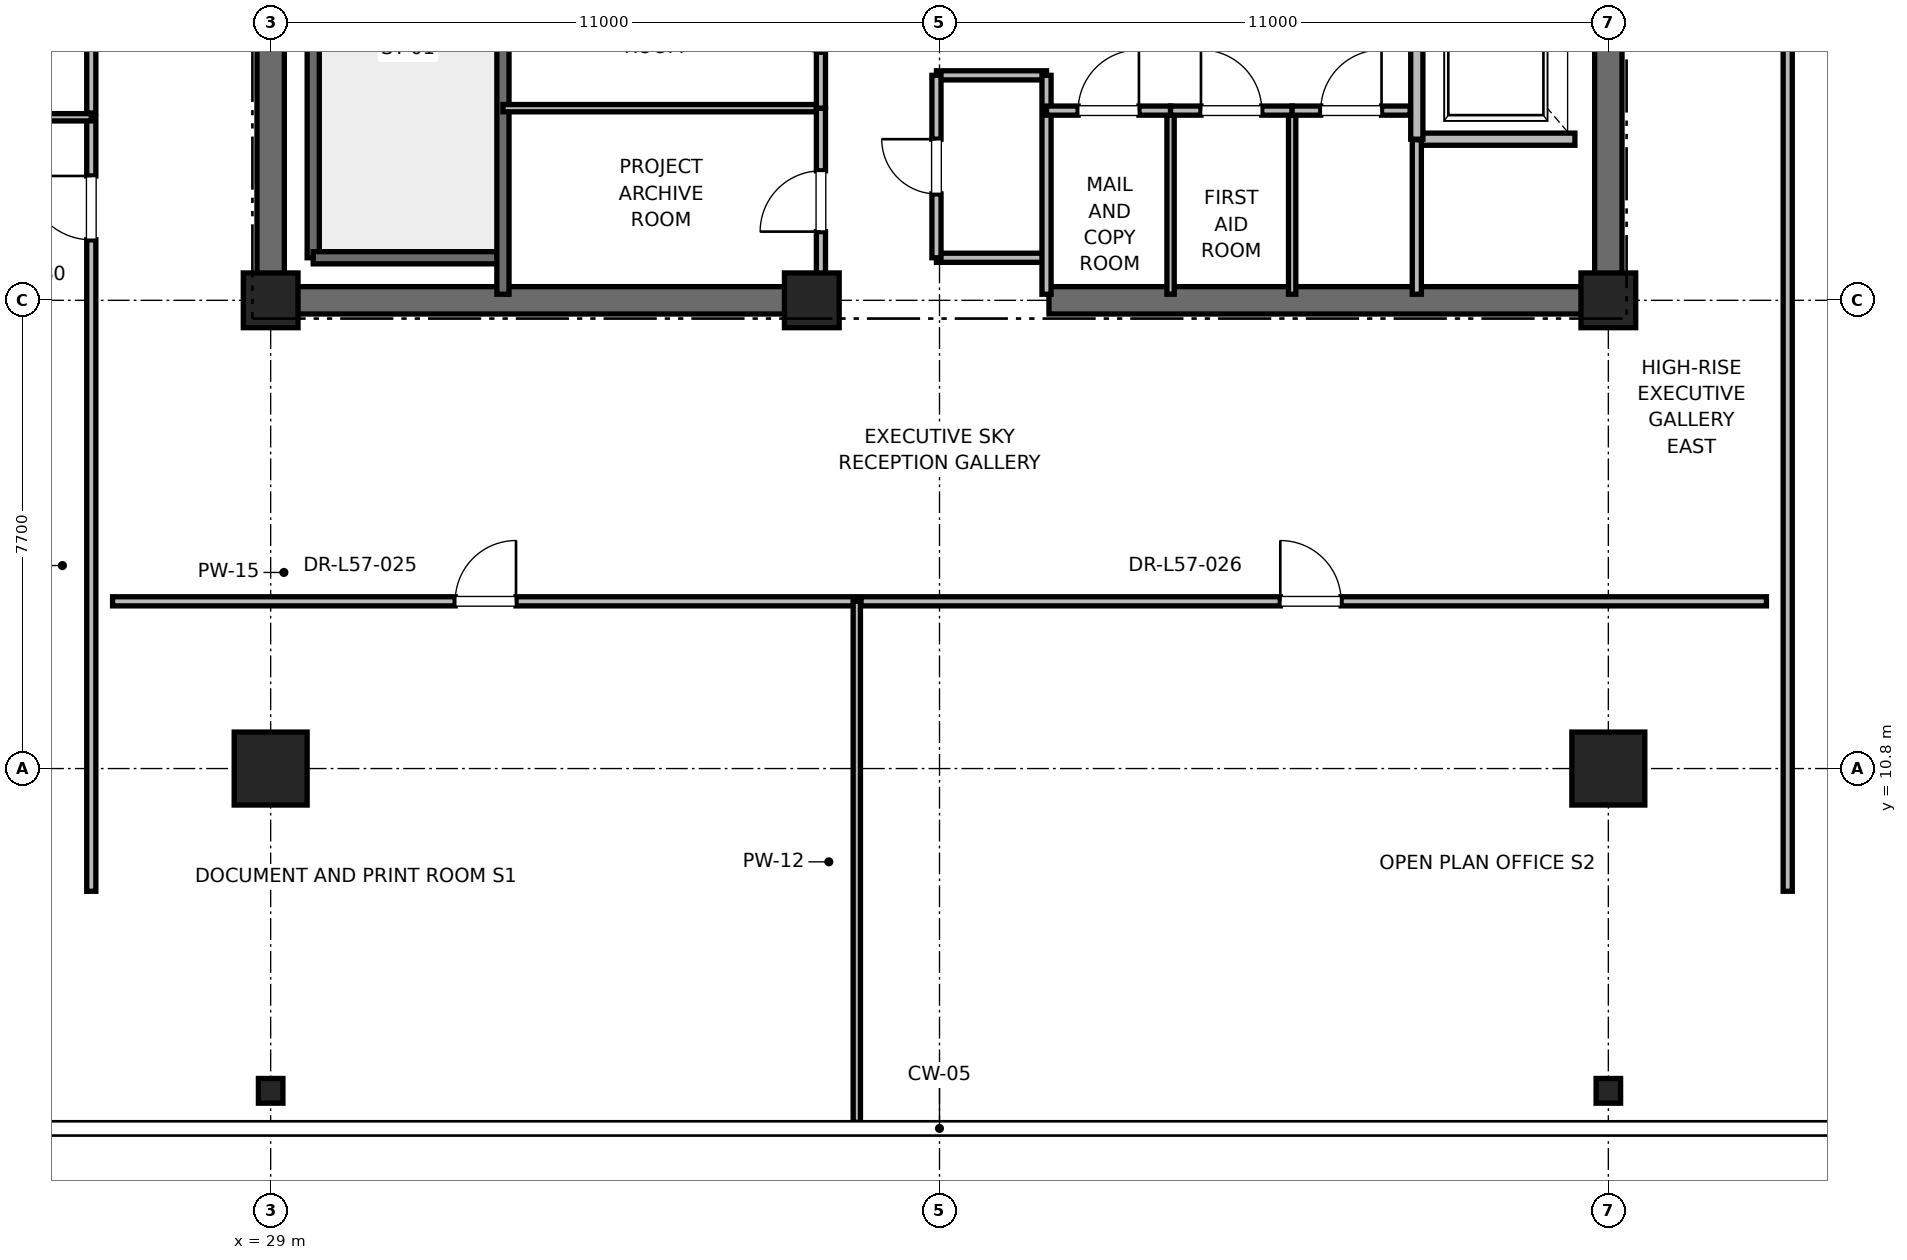
"""IFC4 building model, lengths in metres.
Left out: names, types, materials, properties, quantities, classifications, styles, units other than length and angle.
Written with IfcOpenShell. Run it as: python <this file> out.ifc"""

import sys

from ifc_helpers import new_model, si_unit, direction, frame, frame_2d, origin, origin_2d, place, context, subcontext, project, spatial, rectangle, i_section, extrude, element, fill, save


model = new_model("IFC4")
c1 = context("Model", 3, precision=1e-05, world=origin(), true_north=direction((0.0, 1.0)))
c2 = subcontext(c1, "Body", "Model", "MODEL_VIEW")
j1 = project(units=[si_unit("LENGTHUNIT", "METRE"), si_unit("PLANEANGLEUNIT", "RADIAN")], contexts=[c1])
p1 = place(None, origin())
s1 = spatial("IfcSite", under=j1, at=p1, CompositionType="ELEMENT")
p2 = place(p1, origin())
s2 = spatial("IfcBuilding", under=s1, at=p2, CompositionType="ELEMENT")
p3 = place(p2, frame((0.0, 0.0, 247.2)))
s3 = spatial("IfcBuildingStorey", under=s2, at=p3, CompositionType="ELEMENT", Elevation=247.2)
for number, where, z_axis, x_axis in (
    (1, (29.0, 10.8, 0.0), (0.0, 0.0, 1.0), (1.0, 0.0, 0.0)),
    (2, (51.0, 10.8, 0.0), (0.0, 0.0, 1.0), (1.0, 0.0, 0.0)),
):
    element("IfcColumn", number, at=place(p3, frame(where, z_axis=z_axis, x_axis=x_axis)), inside=s3, PredefinedType="COLUMN", context=c2, shape_type="SweptSolid", body=[
        extrude(rectangle(XDim=1.2, YDim=1.2, at=origin_2d()), origin(), (0.0, 0.0, 1.0), 4.0),
    ])
for number, where, z_axis, x_axis in (
    (3, (29.0, 5.5, 0.0), (0.0, 0.0, 1.0), (1.0, 0.0, 0.0)),
    (4, (51.0, 5.5, 0.0), (0.0, 0.0, 1.0), (1.0, 0.0, 0.0)),
):
    element("IfcColumn", number, at=place(p3, frame(where, z_axis=z_axis, x_axis=x_axis)), inside=s3, PredefinedType="COLUMN", context=c2, shape_type="SweptSolid", body=[
        extrude(i_section(OverallWidth=0.403, OverallDepth=0.406, WebThickness=0.027, FlangeThickness=0.043, FilletRadius=0.015, at=origin_2d()), origin(), (0.0, 0.0, 1.0), 4.0),
    ])
for number, where, z_axis, x_axis in (
    (5, (29.0, 18.5, 0.0), (0.0, 0.0, 1.0), (1.0, 0.0, 0.0)),
    (6, (51.0, 18.5, 0.0), (0.0, 0.0, 1.0), (1.0, 0.0, 0.0)),
    (7, (37.9, 18.5, 0.0), (0.0, 0.0, 1.0), (1.0, 0.0, 0.0)),
):
    element("IfcColumn", number, at=place(p3, frame(where, z_axis=z_axis, x_axis=x_axis)), inside=s3, PredefinedType="PILASTER", context=c2, shape_type="SweptSolid", body=[
        extrude(rectangle(XDim=0.9, YDim=0.9, at=origin_2d()), origin(), (0.0, 0.0, 1.0), 4.0),
    ])
for number, where, z_axis, x_axis in (
    (8, (29.0, 18.5, 0.0), (0.0, 0.0, 1.0), (1.0, 0.0, 0.0)),
    (9, (41.8, 18.5, 0.0), (0.0, 0.0, 1.0), (1.0, 0.0, 0.0)),
):
    element("IfcWall", number, at=place(p3, frame(where, z_axis=z_axis, x_axis=x_axis)), inside=s3, PredefinedType="SHEAR", context=c2, shape_type="SweptSolid", body=[
        extrude(rectangle(XDim=9.2, YDim=0.45, at=frame_2d((4.6, 0.0))), origin(), (0.0, 0.0, 1.0), 3.785),
    ])
p4 = place(p3, frame((29.0, 18.5, 0.0), z_axis=(0.0, 0.0, 1.0), x_axis=(0.0, 1.0, 0.0)))
e10 = element("IfcWall", 10, at=p4, inside=s3, PredefinedType="SHEAR", context=c2, shape_type="SweptSolid", body=[
    extrude(rectangle(XDim=8.8, YDim=0.45, at=frame_2d((4.4, 0.0))), origin(), (0.0, 0.0, 1.0), 3.785),
])
p5 = place(p3, frame((51.0, 18.5, 0.0), z_axis=(0.0, 0.0, 1.0), x_axis=(0.0, 1.0, 0.0)))
e11 = element("IfcWall", 11, at=p5, inside=s3, PredefinedType="SHEAR", context=c2, shape_type="SweptSolid", body=[
    extrude(rectangle(XDim=5.8, YDim=0.45, at=frame_2d((2.9, 0.0))), origin(), (0.0, 0.0, 1.0), 3.785),
])
p6 = place(p3, frame((29.7, 19.2, 0.0), z_axis=(0.0, 0.0, 1.0), x_axis=(0.0, 1.0, 0.0)))
e12 = element("IfcWall", 12, at=p6, inside=s3, PredefinedType="SOLIDWALL", context=c2, shape_type="SweptSolid", body=[
    extrude(rectangle(XDim=8.15, YDim=0.2, at=frame_2d((4.075, 0.0))), origin(), (0.0, 0.0, 1.0), 3.785),
])
p7 = place(p3, frame((29.7, 19.2, 0.0), z_axis=(0.0, 0.0, 1.0), x_axis=(1.0, 0.0, 0.0)))
e13 = element("IfcWall", 13, at=p7, inside=s3, PredefinedType="SOLIDWALL", context=c2, shape_type="SweptSolid", body=[
    extrude(rectangle(XDim=3.12, YDim=0.2, at=frame_2d((1.56, 0.0))), origin(), (0.0, 0.0, 1.0), 3.785),
])
p8 = place(p3, frame((32.82, 18.6, 0.0), z_axis=(0.0, 0.0, 1.0), x_axis=(0.0, 1.0, 0.0)))
e14 = element("IfcWall", 14, at=p8, inside=s3, PredefinedType="SOLIDWALL", context=c2, shape_type="SweptSolid", body=[
    extrude(rectangle(XDim=8.78, YDim=0.2, at=frame_2d((4.39, 0.0))), origin(), (0.0, 0.0, 1.0), 3.785),
])
p9 = place(p3, frame((47.85, 21.15, 0.0), z_axis=(0.0, 0.0, 1.0), x_axis=(1.0, 0.0, 0.0)))
e15 = element("IfcWall", 15, at=p9, inside=s3, PredefinedType="SOLIDWALL", context=c2, shape_type="SweptSolid", body=[
    extrude(rectangle(XDim=2.6, YDim=0.2, at=frame_2d((1.3, 0.0))), origin(), (0.0, 0.0, 1.0), 3.785),
])
p10 = place(p3, frame((47.85, 24.15, 0.0), z_axis=(0.0, 0.0, 1.0), x_axis=(0.0, -1.0, 0.0)))
e16 = element("IfcWall", 16, at=p10, inside=s3, PredefinedType="SOLIDWALL", context=c2, shape_type="SweptSolid", body=[
    extrude(rectangle(XDim=3.0, YDim=0.2, at=frame_2d((1.5, 0.0))), origin(), (0.0, 0.0, 1.0), 3.785),
])
for number, where, z_axis, x_axis in (
    (17, (39.95, 19.2, 0.0), (0.0, 0.0, 1.0), (1.0, 0.0, 0.0)),
    (18, (39.95, 22.2, 0.0), (0.0, 0.0, 1.0), (1.0, 0.0, 0.0)),
):
    element("IfcWall", number, at=place(p3, frame(where, z_axis=z_axis, x_axis=x_axis)), inside=s3, PredefinedType="PARTITIONING", context=c2, shape_type="SweptSolid", body=[
        extrude(rectangle(XDim=1.81, YDim=0.15, at=frame_2d((0.905, 0.0))), origin(), (0.0, 0.0, 1.0), 2.85),
    ])
p11 = place(p3, frame((41.76, 18.6, 0.0), z_axis=(0.0, 0.0, 1.0), x_axis=(0.0, 1.0, 0.0)))
e19 = element("IfcWall", 19, at=p11, inside=s3, PredefinedType="PARTITIONING", context=c2, shape_type="SweptSolid", body=[
    extrude(rectangle(XDim=3.6, YDim=0.15, at=frame_2d((1.8, 0.0))), origin(), (0.0, 0.0, 1.0), 2.85),
])
p12 = place(p3, frame((39.95, 19.2, 0.0), z_axis=(0.0, 0.0, 1.0), x_axis=(0.0, 1.0, 0.0)))
e20 = element("IfcWall", 20, at=p12, inside=s3, PredefinedType="PARTITIONING", context=c2, shape_type="SweptSolid", body=[
    extrude(rectangle(XDim=3.0, YDim=0.15, at=frame_2d((1.5, 0.0))), origin(), (0.0, 0.0, 1.0), 2.85),
])
p13 = place(p12, frame((1.05, 0.0, 0.0)))
e21 = element("IfcOpeningElement", 21, at=p13, cuts=e20, PredefinedType="OPENING", context=c2, shape_type="SweptSolid", body=[
    extrude(rectangle(XDim=0.9, YDim=2.1, at=frame_2d((0.45, 1.05))), frame((0.0, 0.075, 0.0), z_axis=(0.0, -1.0, 0.0), x_axis=(1.0, 0.0, 0.0)), (0.0, 0.0, 1.0), 0.15),
])
p14 = place(p3, frame((32.82, 21.66, 0.0), z_axis=(0.0, 0.0, 1.0), x_axis=(1.0, 0.0, 0.0)))
e22 = element("IfcWall", 22, at=p14, inside=s3, PredefinedType="PARTITIONING", context=c2, shape_type="SweptSolid", body=[
    extrude(rectangle(XDim=5.23, YDim=0.12, at=frame_2d((2.615, 0.0))), origin(), (0.0, 0.0, 1.0), 2.85),
])
p15 = place(p3, frame((38.05, 18.6, 0.0), z_axis=(0.0, 0.0, 1.0), x_axis=(0.0, 1.0, 0.0)))
e23 = element("IfcWall", 23, at=p15, inside=s3, PredefinedType="PARTITIONING", context=c2, shape_type="SweptSolid", body=[
    extrude(rectangle(XDim=3.06, YDim=0.15, at=frame_2d((1.53, 0.0))), origin(), (0.0, 0.0, 1.0), 2.85),
])
p16 = place(p15, frame((1.03, 0.0, 0.0)))
e24 = element("IfcOpeningElement", 24, at=p16, cuts=e23, PredefinedType="OPENING", context=c2, shape_type="SweptSolid", body=[
    extrude(rectangle(XDim=1.0, YDim=2.15, at=frame_2d((0.5, 1.075))), frame((0.0, 0.075, 0.0), z_axis=(0.0, -1.0, 0.0), x_axis=(1.0, 0.0, 0.0)), (0.0, 0.0, 1.0), 0.15),
])
p17 = place(p3, frame((38.05, 21.66, 0.0), z_axis=(0.0, 0.0, 1.0), x_axis=(0.0, 1.0, 0.0)))
e25 = element("IfcWall", 25, at=p17, inside=s3, PredefinedType="PARTITIONING", context=c2, shape_type="SweptSolid", body=[
    extrude(rectangle(XDim=2.84, YDim=0.15, at=frame_2d((1.42, 0.0))), origin(), (0.0, 0.0, 1.0), 2.85),
])
p18 = place(p17, frame((0.92, 0.0, 0.0)))
e26 = element("IfcOpeningElement", 26, at=p18, cuts=e25, PredefinedType="OPENING", context=c2, shape_type="SweptSolid", body=[
    extrude(rectangle(XDim=1.0, YDim=2.15, at=frame_2d((0.5, 1.075))), frame((0.0, 0.075, 0.0), z_axis=(0.0, -1.0, 0.0), x_axis=(1.0, 0.0, 0.0)), (0.0, 0.0, 1.0), 0.15),
])
p19 = place(p3, frame((47.85, 18.6, 0.0), z_axis=(0.0, 0.0, 1.0), x_axis=(0.0, 1.0, 0.0)))
e27 = element("IfcWall", 27, at=p19, inside=s3, PredefinedType="PARTITIONING", context=c2, shape_type="SweptSolid", body=[
    extrude(rectangle(XDim=2.54, YDim=0.15, at=frame_2d((1.27, 0.0))), origin(), (0.0, 0.0, 1.0), 2.85),
])
for number, where, z_axis, x_axis in (
    (28, (43.8, 18.6, 0.0), (0.0, 0.0, 1.0), (0.0, 1.0, 0.0)),
    (29, (45.8, 18.6, 0.0), (0.0, 0.0, 1.0), (0.0, 1.0, 0.0)),
):
    element("IfcWall", number, at=place(p3, frame(where, z_axis=z_axis, x_axis=x_axis)), inside=s3, PredefinedType="PARTITIONING", context=c2, shape_type="SweptSolid", body=[
        extrude(rectangle(XDim=3.02, YDim=0.12, at=frame_2d((1.51, 0.0))), origin(), (0.0, 0.0, 1.0), 2.85),
    ])
p20 = place(p3, frame((41.76, 21.62, 0.0), z_axis=(0.0, 0.0, 1.0), x_axis=(1.0, 0.0, 0.0)))
e30 = element("IfcWall", 30, at=p20, inside=s3, PredefinedType="PARTITIONING", context=c2, shape_type="SweptSolid", body=[
    extrude(rectangle(XDim=2.04, YDim=0.15, at=frame_2d((1.02, 0.0))), origin(), (0.0, 0.0, 1.0), 2.85),
])
p21 = place(p20, frame((0.52, 0.0, 0.0)))
e31 = element("IfcOpeningElement", 31, at=p21, cuts=e30, PredefinedType="OPENING", context=c2, shape_type="SweptSolid", body=[
    extrude(rectangle(XDim=1.0, YDim=2.15, at=frame_2d((0.5, 1.075))), frame((0.0, 0.075, 0.0), z_axis=(0.0, -1.0, 0.0), x_axis=(1.0, 0.0, 0.0)), (0.0, 0.0, 1.0), 0.15),
])
p22 = place(p3, frame((43.8, 21.62, 0.0), z_axis=(0.0, 0.0, 1.0), x_axis=(1.0, 0.0, 0.0)))
e32 = element("IfcWall", 32, at=p22, inside=s3, PredefinedType="PARTITIONING", context=c2, shape_type="SweptSolid", body=[
    extrude(rectangle(XDim=2.0, YDim=0.15, at=frame_2d((1.0, 0.0))), origin(), (0.0, 0.0, 1.0), 2.85),
])
p23 = place(p22, frame((0.5, 0.0, 0.0)))
e33 = element("IfcOpeningElement", 33, at=p23, cuts=e32, PredefinedType="OPENING", context=c2, shape_type="SweptSolid", body=[
    extrude(rectangle(XDim=1.0, YDim=2.15, at=frame_2d((0.5, 1.075))), frame((0.0, 0.075, 0.0), z_axis=(0.0, -1.0, 0.0), x_axis=(1.0, 0.0, 0.0)), (0.0, 0.0, 1.0), 0.15),
])
p24 = place(p3, frame((45.8, 21.62, 0.0), z_axis=(0.0, 0.0, 1.0), x_axis=(1.0, 0.0, 0.0)))
e34 = element("IfcWall", 34, at=p24, inside=s3, PredefinedType="PARTITIONING", context=c2, shape_type="SweptSolid", body=[
    extrude(rectangle(XDim=1.94, YDim=0.15, at=frame_2d((0.97, 0.0))), origin(), (0.0, 0.0, 1.0), 2.85),
])
p25 = place(p24, frame((0.47, 0.0, 0.0)))
e35 = element("IfcOpeningElement", 35, at=p25, cuts=e34, PredefinedType="OPENING", context=c2, shape_type="SweptSolid", body=[
    extrude(rectangle(XDim=1.0, YDim=2.15, at=frame_2d((0.5, 1.075))), frame((0.0, 0.075, 0.0), z_axis=(0.0, -1.0, 0.0), x_axis=(1.0, 0.0, 0.0)), (0.0, 0.0, 1.0), 0.15),
])
p26 = place(p3, frame((26.4, 13.55, 0.0), z_axis=(0.0, 0.0, 1.0), x_axis=(1.0, 0.0, 0.0)))
e36 = element("IfcWall", 36, at=p26, inside=s3, PredefinedType="PARTITIONING", context=c2, shape_type="SweptSolid", body=[
    extrude(rectangle(XDim=12.24, YDim=0.15, at=frame_2d((6.12, 0.0))), origin(), (0.0, 0.0, 1.0), 2.85),
])
p27 = place(p26, frame((5.635, 0.0, 0.0)))
e37 = element("IfcOpeningElement", 37, at=p27, cuts=e36, PredefinedType="OPENING", context=c2, shape_type="SweptSolid", body=[
    extrude(rectangle(XDim=1.0, YDim=2.15, at=frame_2d((0.5, 1.075))), frame((0.0, 0.075, 0.0), z_axis=(0.0, -1.0, 0.0), x_axis=(1.0, 0.0, 0.0)), (0.0, 0.0, 1.0), 0.15),
])
p28 = place(p3, frame((38.64, 4.982, 0.0), z_axis=(0.0, 0.0, 1.0), x_axis=(0.0, 1.0, 0.0)))
e38 = element("IfcWall", 38, at=p28, inside=s3, PredefinedType="PARTITIONING", context=c2, shape_type="SweptSolid", body=[
    extrude(rectangle(XDim=8.568, YDim=0.12, at=frame_2d((4.284, 0.0))), origin(), (0.0, 0.0, 1.0), 2.415),
])
p29 = place(p3, frame((38.71, 13.55, 0.0), z_axis=(0.0, 0.0, 1.0), x_axis=(1.0, 0.0, 0.0)))
e39 = element("IfcWall", 39, at=p29, inside=s3, PredefinedType="PARTITIONING", context=c2, shape_type="SweptSolid", body=[
    extrude(rectangle(XDim=14.89, YDim=0.15, at=frame_2d((7.445, 0.0))), origin(), (0.0, 0.0, 1.0), 2.85),
])
p30 = place(p29, frame((6.895, 0.0, 0.0)))
e40 = element("IfcOpeningElement", 40, at=p30, cuts=e39, PredefinedType="OPENING", context=c2, shape_type="SweptSolid", body=[
    extrude(rectangle(XDim=1.0, YDim=2.15, at=frame_2d((0.5, 1.075))), frame((0.0, 0.075, 0.0), z_axis=(0.0, -1.0, 0.0), x_axis=(1.0, 0.0, 0.0)), (0.0, 0.0, 1.0), 0.15),
])
p31 = place(p3, frame((26.05, 8.782, 0.0), z_axis=(0.0, 0.0, 1.0), x_axis=(0.0, 1.0, 0.0)))
e41 = element("IfcWall", 41, at=p31, inside=s3, PredefinedType="PARTITIONING", context=c2, shape_type="SweptSolid", body=[
    extrude(rectangle(XDim=12.729, YDim=0.15, at=frame_2d((6.364, 0.0))), origin(), (0.0, 0.0, 1.0), 2.85),
])
p32 = place(p31, frame((10.713, 0.0, 0.0)))
e42 = element("IfcOpeningElement", 42, at=p32, cuts=e41, PredefinedType="OPENING", context=c2, shape_type="SweptSolid", body=[
    extrude(rectangle(XDim=1.05, YDim=2.2, at=frame_2d((0.525, 1.1))), frame((0.0, 0.075, 0.0), z_axis=(0.0, -1.0, 0.0), x_axis=(1.0, 0.0, 0.0)), (0.0, 0.0, 1.0), 0.15),
])
p33 = place(p3, frame((13.733, 21.51, 0.0), z_axis=(0.0, 0.0, 1.0), x_axis=(1.0, 0.0, 0.0)))
e43 = element("IfcWall", 43, at=p33, inside=s3, PredefinedType="PARTITIONING", context=c2, shape_type="SweptSolid", body=[
    extrude(rectangle(XDim=12.317, YDim=0.12, at=frame_2d((6.158, 0.0))), origin(), (0.0, 0.0, 1.0), 2.85),
])
p34 = place(p3, frame((26.05, 21.58, 0.0), z_axis=(0.0, 0.0, 1.0), x_axis=(0.0, 1.0, 0.0)))
e44 = element("IfcWall", 44, at=p34, inside=s3, PredefinedType="PARTITIONING", context=c2, shape_type="SweptSolid", body=[
    extrude(rectangle(XDim=12.658, YDim=0.15, at=frame_2d((6.329, 0.0))), origin(), (0.0, 0.0, 1.0), 2.85),
])
p35 = place(p34, frame((5.544, 0.0, 0.0)))
e45 = element("IfcOpeningElement", 45, at=p35, cuts=e44, PredefinedType="OPENING", context=c2, shape_type="SweptSolid", body=[
    extrude(rectangle(XDim=1.5, YDim=2.25, at=frame_2d((0.75, 1.125))), frame((0.0, 0.075, 0.0), z_axis=(0.0, -1.0, 0.0), x_axis=(1.0, 0.0, 0.0)), (0.0, 0.0, 1.0), 0.15),
])
p36 = place(p3, frame((53.95, 8.782, 0.0), z_axis=(0.0, 0.0, 1.0), x_axis=(0.0, 1.0, 0.0)))
e46 = element("IfcWall", 46, at=p36, inside=s3, PredefinedType="PARTITIONING", context=c2, shape_type="SweptSolid", body=[
    extrude(rectangle(XDim=37.437, YDim=0.15, at=frame_2d((18.718, 0.0))), origin(), (0.0, 0.0, 1.0), 2.85),
])
p37 = place(p36, frame((18.218, 0.0, 0.0)))
e47 = element("IfcOpeningElement", 47, at=p37, cuts=e46, PredefinedType="OPENING", context=c2, shape_type="SweptSolid", body=[
    extrude(rectangle(XDim=1.0, YDim=2.15, at=frame_2d((0.5, 1.075))), frame((0.0, 0.075, 0.0), z_axis=(0.0, -1.0, 0.0), x_axis=(1.0, 0.0, 0.0)), (0.0, 0.0, 1.0), 0.15),
])
p38 = place(p13, origin())
e48 = element("IfcDoor", 48, at=p38, inside=s3, OperationType="SINGLE_SWING_RIGHT", PredefinedType="DOOR", context=c2, shape_type="SweptSolid", body=[
    extrude(rectangle(XDim=0.9, YDim=2.1, at=frame_2d((0.45, 1.05))), frame((0.0, 0.025, 0.0), z_axis=(0.0, -1.0, 0.0), x_axis=(1.0, 0.0, 0.0)), (0.0, 0.0, 1.0), 0.05),
])
fill(e21, e48)
p39 = place(p16, origin())
e49 = element("IfcDoor", 49, at=p39, inside=s3, OperationType="SINGLE_SWING_LEFT", PredefinedType="DOOR", context=c2, shape_type="SweptSolid", body=[
    extrude(rectangle(XDim=1.0, YDim=2.15, at=frame_2d((0.5, 1.075))), frame((0.0, 0.025, 0.0), z_axis=(0.0, -1.0, 0.0), x_axis=(1.0, 0.0, 0.0)), (0.0, 0.0, 1.0), 0.05),
])
fill(e24, e49)
p40 = place(p18, origin())
e50 = element("IfcDoor", 50, at=p40, inside=s3, OperationType="SINGLE_SWING_RIGHT", PredefinedType="DOOR", context=c2, shape_type="SweptSolid", body=[
    extrude(rectangle(XDim=1.0, YDim=2.15, at=frame_2d((0.5, 1.075))), frame((0.0, 0.025, 0.0), z_axis=(0.0, -1.0, 0.0), x_axis=(1.0, 0.0, 0.0)), (0.0, 0.0, 1.0), 0.05),
])
fill(e26, e50)
p41 = place(p21, origin())
e51 = element("IfcDoor", 51, at=p41, inside=s3, OperationType="SINGLE_SWING_RIGHT", PredefinedType="DOOR", context=c2, shape_type="SweptSolid", body=[
    extrude(rectangle(XDim=1.0, YDim=2.15, at=frame_2d((0.5, 1.075))), frame((0.0, 0.025, 0.0), z_axis=(0.0, -1.0, 0.0), x_axis=(1.0, 0.0, 0.0)), (0.0, 0.0, 1.0), 0.05),
])
fill(e31, e51)
p42 = place(p23, origin())
e52 = element("IfcDoor", 52, at=p42, inside=s3, OperationType="SINGLE_SWING_LEFT", PredefinedType="DOOR", context=c2, shape_type="SweptSolid", body=[
    extrude(rectangle(XDim=1.0, YDim=2.15, at=frame_2d((0.5, 1.075))), frame((0.0, 0.025, 0.0), z_axis=(0.0, -1.0, 0.0), x_axis=(1.0, 0.0, 0.0)), (0.0, 0.0, 1.0), 0.05),
])
fill(e33, e52)
p43 = place(p25, origin())
e53 = element("IfcDoor", 53, at=p43, inside=s3, OperationType="SINGLE_SWING_RIGHT", PredefinedType="DOOR", context=c2, shape_type="SweptSolid", body=[
    extrude(rectangle(XDim=1.0, YDim=2.15, at=frame_2d((0.5, 1.075))), frame((0.0, 0.025, 0.0), z_axis=(0.0, -1.0, 0.0), x_axis=(1.0, 0.0, 0.0)), (0.0, 0.0, 1.0), 0.05),
])
fill(e35, e53)
p44 = place(p27, origin())
e54 = element("IfcDoor", 54, at=p44, inside=s3, OperationType="SINGLE_SWING_RIGHT", PredefinedType="DOOR", context=c2, shape_type="SweptSolid", body=[
    extrude(rectangle(XDim=1.0, YDim=2.15, at=frame_2d((0.5, 1.075))), frame((0.0, 0.025, 0.0), z_axis=(0.0, -1.0, 0.0), x_axis=(1.0, 0.0, 0.0)), (0.0, 0.0, 1.0), 0.05),
])
fill(e37, e54)
p45 = place(p30, origin())
e55 = element("IfcDoor", 55, at=p45, inside=s3, OperationType="SINGLE_SWING_LEFT", PredefinedType="DOOR", context=c2, shape_type="SweptSolid", body=[
    extrude(rectangle(XDim=1.0, YDim=2.15, at=frame_2d((0.5, 1.075))), frame((0.0, 0.025, 0.0), z_axis=(0.0, -1.0, 0.0), x_axis=(1.0, 0.0, 0.0)), (0.0, 0.0, 1.0), 0.05),
])
fill(e40, e55)
p46 = place(p32, origin())
e56 = element("IfcDoor", 56, at=p46, inside=s3, OperationType="SINGLE_SWING_RIGHT", PredefinedType="DOOR", context=c2, shape_type="SweptSolid", body=[
    extrude(rectangle(XDim=1.05, YDim=2.2, at=frame_2d((0.525, 1.1))), frame((0.0, 0.025, 0.0), z_axis=(0.0, -1.0, 0.0), x_axis=(1.0, 0.0, 0.0)), (0.0, 0.0, 1.0), 0.05),
])
fill(e42, e56)
save(model, sys.argv[1])
